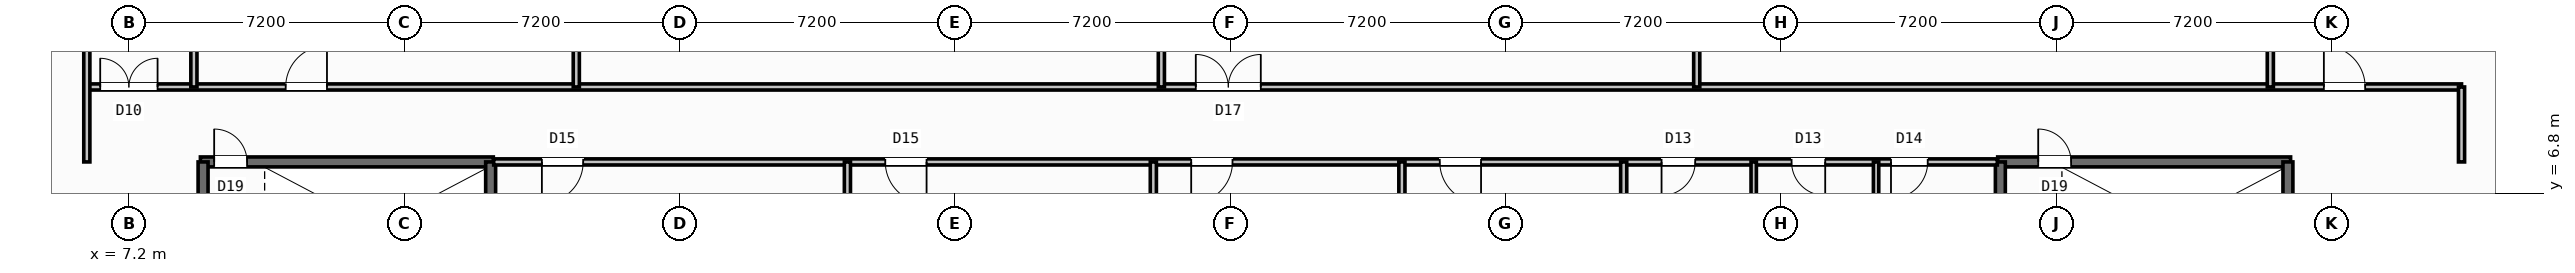
"""IFC4 building model, lengths in metres.
Left out: names, types, materials, properties, quantities, classifications, styles, units other than length and angle.
Written with IfcOpenShell. Run it as: python <this file> out.ifc"""

import sys

from ifc_helpers import new_model, si_unit, direction, frame, frame_2d, origin, place, context, subcontext, project, spatial, rectangle, extrude, source, transform, mapped, element, fill, save


model = new_model("IFC4")
c1 = context("Model", 3, precision=1e-05, world=origin(), true_north=direction((0.0, 1.0)))
c2 = subcontext(c1, "Body", "Model", "MODEL_VIEW")
j1 = project(units=[si_unit("LENGTHUNIT", "METRE"), si_unit("PLANEANGLEUNIT", "RADIAN")], contexts=[c1])
p1 = place(None, origin())
s1 = spatial("IfcSite", under=j1, at=p1, CompositionType="ELEMENT")
p2 = place(p1, origin())
s2 = spatial("IfcBuilding", under=s1, at=p2, CompositionType="ELEMENT")
p3 = place(p2, frame((0.0, 0.0, 18.6)))
s3 = spatial("IfcBuildingStorey", under=s2, at=p3, CompositionType="ELEMENT", Elevation=18.6)
p4 = place(p3, frame((9.07, 7.62, 0.0), z_axis=(0.0, 0.0, 1.0), x_axis=(1.0, 0.0, 0.0)))
e1 = element("IfcWall", 1, at=p4, inside=s3, PredefinedType="SHEAR", context=c2, shape_type="SweptSolid", body=[
    extrude(rectangle(XDim=7.66, YDim=0.26, at=frame_2d((3.83, 0.0))), origin(), (0.0, 0.0, 1.0), 5.2),
])
p5 = place(p4, frame((0.36, 0.0, 0.0)))
e2 = element("IfcOpeningElement", 2, at=p5, cuts=e1, PredefinedType="OPENING", context=c2, shape_type="SweptSolid", body=[
    extrude(rectangle(XDim=0.86, YDim=2.05, at=frame_2d((0.43, 1.025))), frame((0.0, 0.14, 0.0), z_axis=(0.0, -1.0, 0.0), x_axis=(1.0, 0.0, 0.0)), (0.0, 0.0, 1.0), 0.28),
])
for number, where, z_axis, x_axis in (
    (3, (9.14, 4.26, 0.0), (0.0, 0.0, 1.0), (0.0, 1.0, 0.0)),
    (4, (16.66, 4.26, 0.0), (0.0, 0.0, 1.0), (0.0, 1.0, 0.0)),
):
    element("IfcWall", number, at=place(p3, frame(where, z_axis=z_axis, x_axis=x_axis)), inside=s3, PredefinedType="SHEAR", context=c2, shape_type="SweptSolid", body=[
        extrude(rectangle(XDim=3.36, YDim=0.26, at=frame_2d((1.68, 0.0))), origin(), (0.0, 0.0, 1.0), 5.2),
    ])
p6 = place(p3, frame((56.07, 7.62, 0.0), z_axis=(0.0, 0.0, 1.0), x_axis=(1.0, 0.0, 0.0)))
e5 = element("IfcWall", 5, at=p6, inside=s3, PredefinedType="SHEAR", context=c2, shape_type="SweptSolid", body=[
    extrude(rectangle(XDim=7.66, YDim=0.26, at=frame_2d((3.83, 0.0))), origin(), (0.0, 0.0, 1.0), 5.2),
])
p7 = place(p6, frame((1.06, 0.0, 0.0)))
e6 = element("IfcOpeningElement", 6, at=p7, cuts=e5, PredefinedType="OPENING", context=c2, shape_type="SweptSolid", body=[
    extrude(rectangle(XDim=0.86, YDim=2.05, at=frame_2d((0.43, 1.025))), frame((0.0, 0.14, 0.0), z_axis=(0.0, -1.0, 0.0), x_axis=(1.0, 0.0, 0.0)), (0.0, 0.0, 1.0), 0.28),
])
for number, where, z_axis, x_axis in (
    (7, (56.14, 4.26, 0.0), (0.0, 0.0, 1.0), (0.0, 1.0, 0.0)),
    (8, (63.66, 4.26, 0.0), (0.0, 0.0, 1.0), (0.0, 1.0, 0.0)),
):
    element("IfcWall", number, at=place(p3, frame(where, z_axis=z_axis, x_axis=x_axis)), inside=s3, PredefinedType="SHEAR", context=c2, shape_type="SweptSolid", body=[
        extrude(rectangle(XDim=3.36, YDim=0.26, at=frame_2d((1.68, 0.0))), origin(), (0.0, 0.0, 1.0), 5.2),
    ])
p8 = place(p3, frame((6.1, 9.58, 0.0), z_axis=(0.0, 0.0, 1.0), x_axis=(1.0, 0.0, 0.0)))
e9 = element("IfcWall", 9, at=p8, inside=s3, PredefinedType="PARTITIONING", context=c2, shape_type="SweptSolid", body=[
    extrude(rectangle(XDim=62.1, YDim=0.16, at=frame_2d((31.05, 0.0))), origin(), (0.0, 0.0, 1.0), 4.94),
])
p9 = place(p8, frame((29.0, 0.0, 0.0)))
e10 = element("IfcOpeningElement", 10, at=p9, cuts=e9, PredefinedType="OPENING", context=c2, shape_type="SweptSolid", body=[
    extrude(rectangle(XDim=1.7, YDim=2.2, at=frame_2d((0.85, 1.1))), frame((0.0, 0.09, 0.0), z_axis=(0.0, -1.0, 0.0), x_axis=(1.0, 0.0, 0.0)), (0.0, 0.0, 1.0), 0.18),
])
p10 = place(p8, frame((0.35, 0.0, 0.0)))
e11 = element("IfcOpeningElement", 11, at=p10, cuts=e9, PredefinedType="OPENING", context=c2, shape_type="SweptSolid", body=[
    extrude(rectangle(XDim=1.5, YDim=2.15, at=frame_2d((0.75, 1.075))), frame((0.0, 0.09, 0.0), z_axis=(0.0, -1.0, 0.0), x_axis=(1.0, 0.0, 0.0)), (0.0, 0.0, 1.0), 0.18),
])
p11 = place(p8, frame((5.2, 0.0, 0.0)))
e12 = element("IfcOpeningElement", 12, at=p11, cuts=e9, PredefinedType="OPENING", context=c2, shape_type="SweptSolid", body=[
    extrude(rectangle(XDim=1.08, YDim=2.15, at=frame_2d((0.54, 1.075))), frame((0.0, 0.09, 0.0), z_axis=(0.0, -1.0, 0.0), x_axis=(1.0, 0.0, 0.0)), (0.0, 0.0, 1.0), 0.18),
])
p12 = place(p8, frame((58.5, 0.0, 0.0)))
e13 = element("IfcOpeningElement", 13, at=p12, cuts=e9, PredefinedType="OPENING", context=c2, shape_type="SweptSolid", body=[
    extrude(rectangle(XDim=1.08, YDim=2.15, at=frame_2d((0.54, 1.075))), frame((0.0, 0.09, 0.0), z_axis=(0.0, -1.0, 0.0), x_axis=(1.0, 0.0, 0.0)), (0.0, 0.0, 1.0), 0.18),
])
p13 = place(p3, frame((16.74, 7.62, 0.0), z_axis=(0.0, 0.0, 1.0), x_axis=(1.0, 0.0, 0.0)))
e14 = element("IfcWall", 14, at=p13, inside=s3, PredefinedType="PARTITIONING", context=c2, shape_type="SweptSolid", body=[
    extrude(rectangle(XDim=39.32, YDim=0.16, at=frame_2d((19.66, 0.0))), origin(), (0.0, 0.0, 1.0), 4.94),
])
p14 = place(p13, frame((1.26, 0.0, 0.0)))
e15 = element("IfcOpeningElement", 15, at=p14, cuts=e14, PredefinedType="OPENING", context=c2, shape_type="SweptSolid", body=[
    extrude(rectangle(XDim=1.08, YDim=2.15, at=frame_2d((0.54, 1.075))), frame((0.0, 0.09, 0.0), z_axis=(0.0, -1.0, 0.0), x_axis=(1.0, 0.0, 0.0)), (0.0, 0.0, 1.0), 0.18),
])
p15 = place(p13, frame((10.24, 0.0, 0.0)))
e16 = element("IfcOpeningElement", 16, at=p15, cuts=e14, PredefinedType="OPENING", context=c2, shape_type="SweptSolid", body=[
    extrude(rectangle(XDim=1.08, YDim=2.15, at=frame_2d((0.54, 1.075))), frame((0.0, 0.09, 0.0), z_axis=(0.0, -1.0, 0.0), x_axis=(1.0, 0.0, 0.0)), (0.0, 0.0, 1.0), 0.18),
])
p16 = place(p13, frame((18.24, 0.0, 0.0)))
e17 = element("IfcOpeningElement", 17, at=p16, cuts=e14, PredefinedType="OPENING", context=c2, shape_type="SweptSolid", body=[
    extrude(rectangle(XDim=1.08, YDim=2.15, at=frame_2d((0.54, 1.075))), frame((0.0, 0.09, 0.0), z_axis=(0.0, -1.0, 0.0), x_axis=(1.0, 0.0, 0.0)), (0.0, 0.0, 1.0), 0.18),
])
p17 = place(p13, frame((24.74, 0.0, 0.0)))
e18 = element("IfcOpeningElement", 18, at=p17, cuts=e14, PredefinedType="OPENING", context=c2, shape_type="SweptSolid", body=[
    extrude(rectangle(XDim=1.08, YDim=2.15, at=frame_2d((0.54, 1.075))), frame((0.0, 0.09, 0.0), z_axis=(0.0, -1.0, 0.0), x_axis=(1.0, 0.0, 0.0)), (0.0, 0.0, 1.0), 0.18),
])
p18 = place(p13, frame((30.54, 0.0, 0.0)))
e19 = element("IfcOpeningElement", 19, at=p18, cuts=e14, PredefinedType="OPENING", context=c2, shape_type="SweptSolid", body=[
    extrude(rectangle(XDim=0.88, YDim=2.08, at=frame_2d((0.44, 1.04))), frame((0.0, 0.09, 0.0), z_axis=(0.0, -1.0, 0.0), x_axis=(1.0, 0.0, 0.0)), (0.0, 0.0, 1.0), 0.18),
])
p19 = place(p13, frame((33.94, 0.0, 0.0)))
e20 = element("IfcOpeningElement", 20, at=p19, cuts=e14, PredefinedType="OPENING", context=c2, shape_type="SweptSolid", body=[
    extrude(rectangle(XDim=0.88, YDim=2.08, at=frame_2d((0.44, 1.04))), frame((0.0, 0.09, 0.0), z_axis=(0.0, -1.0, 0.0), x_axis=(1.0, 0.0, 0.0)), (0.0, 0.0, 1.0), 0.18),
])
p20 = place(p13, frame((36.54, 0.0, 0.0)))
e21 = element("IfcOpeningElement", 21, at=p20, cuts=e14, PredefinedType="OPENING", context=c2, shape_type="SweptSolid", body=[
    extrude(rectangle(XDim=0.96, YDim=2.08, at=frame_2d((0.48, 1.04))), frame((0.0, 0.09, 0.0), z_axis=(0.0, -1.0, 0.0), x_axis=(1.0, 0.0, 0.0)), (0.0, 0.0, 1.0), 0.18),
])
p21 = place(p3, frame((34.2, 9.58, 0.0), z_axis=(0.0, 0.0, 1.0), x_axis=(0.0, 1.0, 0.0)))
e22 = element("IfcWall", 22, at=p21, inside=s3, PredefinedType="PARTITIONING", context=c2, shape_type="SweptSolid", body=[
    extrude(rectangle(XDim=4.085, YDim=0.16, at=frame_2d((2.043, 0.0))), origin(), (0.0, 0.0, 1.0), 4.94),
])
p22 = place(p3, frame((48.2, 9.58, 0.0), z_axis=(0.0, 0.0, 1.0), x_axis=(0.0, 1.0, 0.0)))
e23 = element("IfcWall", 23, at=p22, inside=s3, PredefinedType="PARTITIONING", context=c2, shape_type="SweptSolid", body=[
    extrude(rectangle(XDim=6.22, YDim=0.16, at=frame_2d((3.11, 0.0))), origin(), (0.0, 0.0, 1.0), 4.94),
])
for number, where, z_axis, x_axis in (
    (24, (25.99, 1.6, 0.0), (0.0, 0.0, 1.0), (0.0, 1.0, 0.0)),
    (25, (33.99, 1.6, 0.0), (0.0, 0.0, 1.0), (0.0, 1.0, 0.0)),
    (26, (40.49, 1.6, 0.0), (0.0, 0.0, 1.0), (0.0, 1.0, 0.0)),
    (27, (46.29, 1.6, 0.0), (0.0, 0.0, 1.0), (0.0, 1.0, 0.0)),
):
    element("IfcWall", number, at=place(p3, frame(where, z_axis=z_axis, x_axis=x_axis)), inside=s3, PredefinedType="PARTITIONING", context=c2, shape_type="SweptSolid", body=[
        extrude(rectangle(XDim=6.02, YDim=0.16, at=frame_2d((3.01, 0.0))), origin(), (0.0, 0.0, 1.0), 4.94),
    ])
for number, where, z_axis, x_axis in (
    (28, (49.69, 1.6, 0.0), (0.0, 0.0, 1.0), (0.0, 1.0, 0.0)),
    (29, (52.89, 1.6, 0.0), (0.0, 0.0, 1.0), (0.0, 1.0, 0.0)),
):
    element("IfcWall", number, at=place(p3, frame(where, z_axis=z_axis, x_axis=x_axis)), inside=s3, PredefinedType="PLUMBINGWALL", context=c2, shape_type="SweptSolid", body=[
        extrude(rectangle(XDim=6.02, YDim=0.14, at=frame_2d((3.01, 0.0))), origin(), (0.0, 0.0, 1.0), 4.94),
    ])
p23 = place(p3, frame((6.1, 7.62, 0.0), z_axis=(0.0, 0.0, 1.0), x_axis=(0.0, 1.0, 0.0)))
e30 = element("IfcWall", 30, at=p23, inside=s3, PredefinedType="PARTITIONING", context=c2, shape_type="SweptSolid", body=[
    extrude(rectangle(XDim=20.67, YDim=0.16, at=frame_2d((10.335, 0.0))), origin(), (0.0, 0.0, 1.0), 4.94),
])
for number, where, z_axis, x_axis in (
    (31, (8.9, 9.58, 0.0), (0.0, 0.0, 1.0), (0.0, 1.0, 0.0)),
    (32, (18.9, 9.58, 0.0), (0.0, 0.0, 1.0), (0.0, 1.0, 0.0)),
):
    element("IfcWall", number, at=place(p3, frame(where, z_axis=z_axis, x_axis=x_axis)), inside=s3, PredefinedType="PARTITIONING", context=c2, shape_type="SweptSolid", body=[
        extrude(rectangle(XDim=25.57, YDim=0.16, at=frame_2d((12.785, 0.0))), origin(), (0.0, 0.0, 1.0), 4.94),
    ])
p24 = place(p3, frame((63.2, 9.58, 0.0), z_axis=(0.0, 0.0, 1.0), x_axis=(0.0, 1.0, 0.0)))
e33 = element("IfcWall", 33, at=p24, inside=s3, PredefinedType="PARTITIONING", context=c2, shape_type="SweptSolid", body=[
    extrude(rectangle(XDim=19.147, YDim=0.16, at=frame_2d((9.573, 0.0))), origin(), (0.0, 0.0, 1.0), 4.94),
])
p25 = place(p3, frame((68.2, 7.62, 0.0), z_axis=(0.0, 0.0, 1.0), x_axis=(0.0, 1.0, 0.0)))
e34 = element("IfcWall", 34, at=p25, inside=s3, PredefinedType="PARTITIONING", context=c2, shape_type="SweptSolid", body=[
    extrude(rectangle(XDim=1.96, YDim=0.16, at=frame_2d((0.98, 0.0))), origin(), (0.0, 0.0, 1.0), 4.94),
])
m1 = source(origin(), c2, "Body", "SweptSolid", [
    extrude(rectangle(XDim=0.86, YDim=2.05, at=frame_2d((0.43, 1.025))), frame((0.0, 0.025, 0.0), z_axis=(0.0, -1.0, 0.0), x_axis=(1.0, 0.0, 0.0)), (0.0, 0.0, 1.0), 0.05),
])
p26 = place(p5, origin())
e35 = element("IfcDoor", 35, at=p26, inside=s3, OperationType="SINGLE_SWING_LEFT", PredefinedType="DOOR", context=c2, shape_type="MappedRepresentation", body=[
    mapped(m1, transform((0.0, 0.0, 0.0), scale=1.0)),
])
fill(e2, e35)
p27 = place(p7, origin())
e36 = element("IfcDoor", 36, at=p27, inside=s3, OperationType="SINGLE_SWING_LEFT", PredefinedType="DOOR", context=c2, shape_type="MappedRepresentation", body=[
    mapped(m1, transform((0.0, 0.0, 0.0), scale=1.0)),
])
fill(e6, e36)
m2 = source(origin(), c2, "Body", "SweptSolid", [
    extrude(rectangle(XDim=1.7, YDim=2.2, at=frame_2d((0.85, 1.1))), frame((0.0, 0.025, 0.0), z_axis=(0.0, -1.0, 0.0), x_axis=(1.0, 0.0, 0.0)), (0.0, 0.0, 1.0), 0.05),
])
p28 = place(p9, origin())
e37 = element("IfcDoor", 37, at=p28, inside=s3, OperationType="DOUBLE_DOOR_SINGLE_SWING", PredefinedType="DOOR", context=c2, shape_type="MappedRepresentation", body=[
    mapped(m2, transform((0.0, 0.0, 0.0), scale=1.0)),
])
fill(e10, e37)
m3 = source(origin(), c2, "Body", "SweptSolid", [
    extrude(rectangle(XDim=1.08, YDim=2.15, at=frame_2d((0.54, 1.075))), frame((0.0, 0.025, 0.0), z_axis=(0.0, -1.0, 0.0), x_axis=(1.0, 0.0, 0.0)), (0.0, 0.0, 1.0), 0.05),
])
p29 = place(p14, frame((1.08, 0.0, 0.0), z_axis=(0.0, 0.0, 1.0), x_axis=(-1.0, 0.0, 0.0)))
e38 = element("IfcDoor", 38, at=p29, inside=s3, OperationType="SINGLE_SWING_RIGHT", PredefinedType="DOOR", context=c2, shape_type="MappedRepresentation", body=[
    mapped(m3, transform((0.0, 0.0, 0.0), scale=1.0)),
])
fill(e15, e38)
p30 = place(p15, frame((1.08, 0.0, 0.0), z_axis=(0.0, 0.0, 1.0), x_axis=(-1.0, 0.0, 0.0)))
e39 = element("IfcDoor", 39, at=p30, inside=s3, OperationType="SINGLE_SWING_LEFT", PredefinedType="DOOR", context=c2, shape_type="MappedRepresentation", body=[
    mapped(m3, transform((0.0, 0.0, 0.0), scale=1.0)),
])
fill(e16, e39)
p31 = place(p16, frame((1.08, 0.0, 0.0), z_axis=(0.0, 0.0, 1.0), x_axis=(-1.0, 0.0, 0.0)))
e40 = element("IfcDoor", 40, at=p31, inside=s3, OperationType="SINGLE_SWING_RIGHT", PredefinedType="DOOR", context=c2, shape_type="MappedRepresentation", body=[
    mapped(m3, transform((0.0, 0.0, 0.0), scale=1.0)),
])
fill(e17, e40)
p32 = place(p17, frame((1.08, 0.0, 0.0), z_axis=(0.0, 0.0, 1.0), x_axis=(-1.0, 0.0, 0.0)))
e41 = element("IfcDoor", 41, at=p32, inside=s3, OperationType="SINGLE_SWING_LEFT", PredefinedType="DOOR", context=c2, shape_type="MappedRepresentation", body=[
    mapped(m3, transform((0.0, 0.0, 0.0), scale=1.0)),
])
fill(e18, e41)
m4 = source(origin(), c2, "Body", "SweptSolid", [
    extrude(rectangle(XDim=0.88, YDim=2.08, at=frame_2d((0.44, 1.04))), frame((0.0, 0.025, 0.0), z_axis=(0.0, -1.0, 0.0), x_axis=(1.0, 0.0, 0.0)), (0.0, 0.0, 1.0), 0.05),
])
p33 = place(p18, frame((0.88, 0.0, 0.0), z_axis=(0.0, 0.0, 1.0), x_axis=(-1.0, 0.0, 0.0)))
e42 = element("IfcDoor", 42, at=p33, inside=s3, OperationType="SINGLE_SWING_RIGHT", PredefinedType="DOOR", context=c2, shape_type="MappedRepresentation", body=[
    mapped(m4, transform((0.0, 0.0, 0.0), scale=1.0)),
])
fill(e19, e42)
p34 = place(p19, frame((0.88, 0.0, 0.0), z_axis=(0.0, 0.0, 1.0), x_axis=(-1.0, 0.0, 0.0)))
e43 = element("IfcDoor", 43, at=p34, inside=s3, OperationType="SINGLE_SWING_LEFT", PredefinedType="DOOR", context=c2, shape_type="MappedRepresentation", body=[
    mapped(m4, transform((0.0, 0.0, 0.0), scale=1.0)),
])
fill(e20, e43)
m5 = source(origin(), c2, "Body", "SweptSolid", [
    extrude(rectangle(XDim=0.96, YDim=2.08, at=frame_2d((0.48, 1.04))), frame((0.0, 0.025, 0.0), z_axis=(0.0, -1.0, 0.0), x_axis=(1.0, 0.0, 0.0)), (0.0, 0.0, 1.0), 0.05),
])
p35 = place(p20, frame((0.96, 0.0, 0.0), z_axis=(0.0, 0.0, 1.0), x_axis=(-1.0, 0.0, 0.0)))
e44 = element("IfcDoor", 44, at=p35, inside=s3, OperationType="SINGLE_SWING_RIGHT", PredefinedType="DOOR", context=c2, shape_type="MappedRepresentation", body=[
    mapped(m5, transform((0.0, 0.0, 0.0), scale=1.0)),
])
fill(e21, e44)
m6 = source(origin(), c2, "Body", "SweptSolid", [
    extrude(rectangle(XDim=1.5, YDim=2.15, at=frame_2d((0.75, 1.075))), frame((0.0, 0.025, 0.0), z_axis=(0.0, -1.0, 0.0), x_axis=(1.0, 0.0, 0.0)), (0.0, 0.0, 1.0), 0.05),
])
p36 = place(p10, origin())
e45 = element("IfcDoor", 45, at=p36, inside=s3, OperationType="DOUBLE_DOOR_SINGLE_SWING", PredefinedType="DOOR", context=c2, shape_type="MappedRepresentation", body=[
    mapped(m6, transform((0.0, 0.0, 0.0), scale=1.0)),
])
fill(e11, e45)
p37 = place(p11, origin())
e46 = element("IfcDoor", 46, at=p37, inside=s3, OperationType="SINGLE_SWING_RIGHT", PredefinedType="DOOR", context=c2, shape_type="MappedRepresentation", body=[
    mapped(m3, transform((0.0, 0.0, 0.0), scale=1.0)),
])
fill(e12, e46)
p38 = place(p12, origin())
e47 = element("IfcDoor", 47, at=p38, inside=s3, OperationType="SINGLE_SWING_LEFT", PredefinedType="DOOR", context=c2, shape_type="MappedRepresentation", body=[
    mapped(m3, transform((0.0, 0.0, 0.0), scale=1.0)),
])
fill(e13, e47)
save(model, sys.argv[1])
